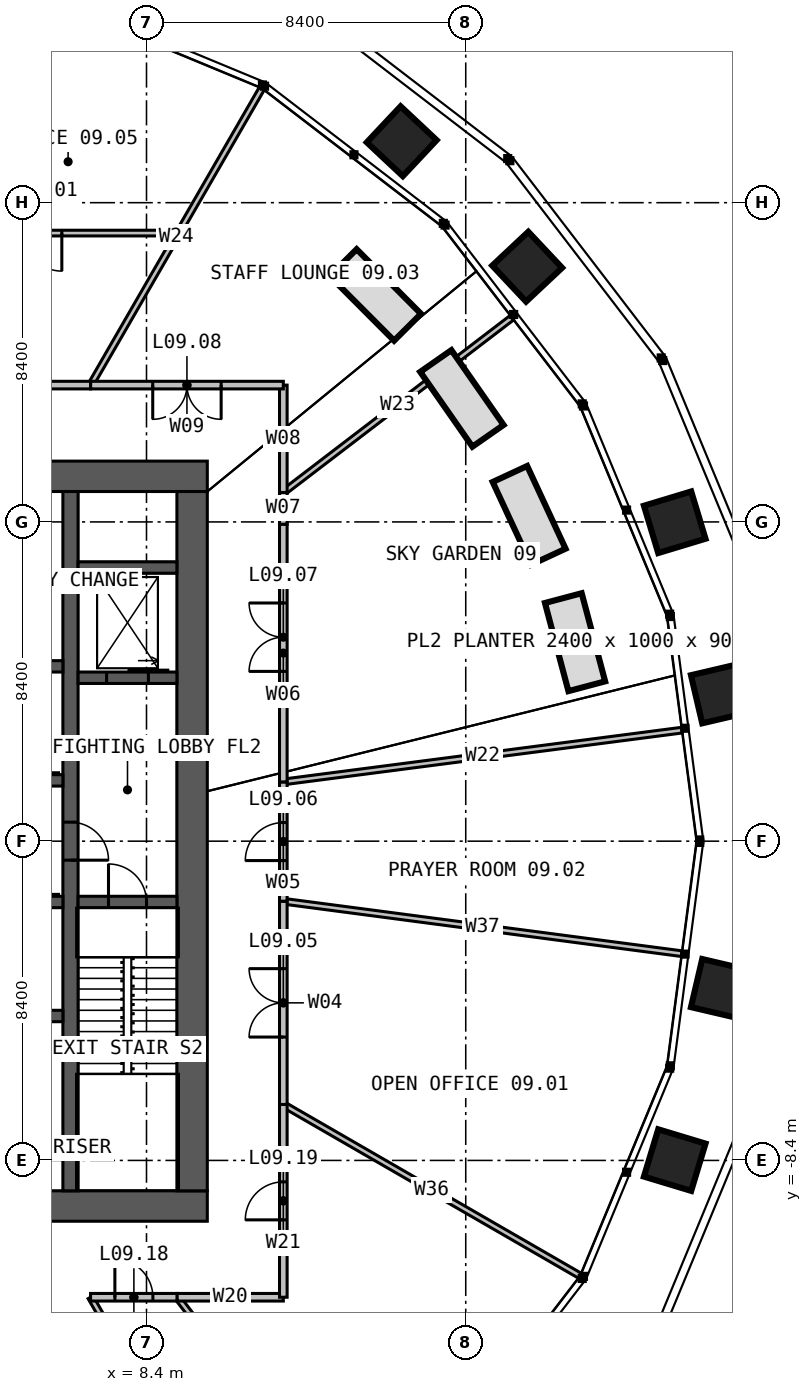
"""IFC4 building model, lengths in metres.
Left out: names, types, materials, properties, quantities, classifications, styles, units other than length and angle.
Written with IfcOpenShell. Run it as: python <this file> out.ifc"""

import sys

from ifc_helpers import new_model, si_unit, direction, frame, frame_2d, origin, place, context, subcontext, project, spatial, rectangle, extrude, element, fill, save


model = new_model("IFC4")
c1 = context("Model", 3, precision=1e-05, world=origin(), true_north=direction((0.0, 1.0)))
c2 = subcontext(c1, "Body", "Model", "MODEL_VIEW")
j1 = project(units=[si_unit("LENGTHUNIT", "METRE"), si_unit("PLANEANGLEUNIT", "RADIAN")], contexts=[c1])
p1 = place(None, origin())
s1 = spatial("IfcSite", under=j1, at=p1, CompositionType="ELEMENT")
p2 = place(p1, origin())
s2 = spatial("IfcBuilding", under=s1, at=p2, CompositionType="ELEMENT")
p3 = place(p2, frame((0.0, 0.0, 41.0)))
s3 = spatial("IfcBuildingStorey", under=s2, at=p3, CompositionType="ELEMENT", Elevation=41.0)
p4 = place(p3, frame((-10.0, 9.6, 0.0), z_axis=(0.0, 0.0, 1.0), x_axis=(1.0, 0.0, 0.0)))
e1 = element("IfcWall", 1, at=p4, inside=s3, PredefinedType="SOLIDWALL", context=c2, shape_type="SweptSolid", body=[
    extrude(rectangle(XDim=20.0, YDim=0.8, at=frame_2d((10.0, 0.0))), origin(), (0.0, 0.0, 1.0), 4.0),
])
p5 = place(p4, frame((9.4, 0.0, 0.0)))
e2 = element("IfcOpeningElement", 2, at=p5, cuts=e1, PredefinedType="OPENING", context=c2, shape_type="SweptSolid", body=[
    extrude(rectangle(XDim=1.2, YDim=2.2, at=frame_2d((0.6, 1.1))), frame((0.0, 0.41, 0.0), z_axis=(0.0, -1.0, 0.0), x_axis=(1.0, 0.0, 0.0)), (0.0, 0.0, 1.0), 0.82),
])
p6 = place(p3, frame((10.0, -9.6, 0.0), z_axis=(0.0, 0.0, 1.0), x_axis=(-1.0, 0.0, 0.0)))
e3 = element("IfcWall", 3, at=p6, inside=s3, PredefinedType="SOLIDWALL", context=c2, shape_type="SweptSolid", body=[
    extrude(rectangle(XDim=20.0, YDim=0.8, at=frame_2d((10.0, 0.0))), origin(), (0.0, 0.0, 1.0), 4.0),
])
p7 = place(p6, frame((6.875, 0.0, 0.0)))
e4 = element("IfcOpeningElement", 4, at=p7, cuts=e3, PredefinedType="OPENING", context=c2, shape_type="SweptSolid", body=[
    extrude(rectangle(XDim=1.2, YDim=2.2, at=frame_2d((0.6, 1.1))), frame((0.0, 0.41, 0.0), z_axis=(0.0, -1.0, 0.0), x_axis=(1.0, 0.0, 0.0)), (0.0, 0.0, 1.0), 0.82),
])
p8 = place(p3, frame((9.6, -9.2, 0.0), z_axis=(0.0, 0.0, 1.0), x_axis=(0.0, 1.0, 0.0)))
e5 = element("IfcWall", 5, at=p8, inside=s3, PredefinedType="SOLIDWALL", context=c2, shape_type="SweptSolid", body=[
    extrude(rectangle(XDim=18.4, YDim=0.8, at=frame_2d((9.2, 0.0))), origin(), (0.0, 0.0, 1.0), 4.0),
])
p9 = place(p3, frame((6.4, 9.2, 0.0), z_axis=(0.0, 0.0, 1.0), x_axis=(0.0, -1.0, 0.0)))
e6 = element("IfcWall", 6, at=p9, inside=s3, PredefinedType="SOLIDWALL", context=c2, shape_type="SweptSolid", body=[
    extrude(rectangle(XDim=18.4, YDim=0.4, at=frame_2d((9.2, 0.0))), origin(), (0.0, 0.0, 1.0), 4.0),
])
p10 = place(p9, frame((8.7, 0.0, 0.0)))
e7 = element("IfcOpeningElement", 7, at=p10, cuts=e6, PredefinedType="OPENING", context=c2, shape_type="SweptSolid", body=[
    extrude(rectangle(XDim=1.0, YDim=2.2, at=frame_2d((0.5, 1.1))), frame((0.0, 0.21, 0.0), z_axis=(0.0, -1.0, 0.0), x_axis=(1.0, 0.0, 0.0)), (0.0, 0.0, 1.0), 0.42),
])
p11 = place(p3, frame((1.35, 1.6, 0.0), z_axis=(0.0, 0.0, 1.0), x_axis=(1.0, 0.0, 0.0)))
e8 = element("IfcWall", 8, at=p11, inside=s3, PredefinedType="SOLIDWALL", context=c2, shape_type="SweptSolid", body=[
    extrude(rectangle(XDim=4.85, YDim=0.3, at=frame_2d((2.425, 0.0))), origin(), (0.0, 0.0, 1.0), 4.0),
])
p12 = place(p11, frame((0.6, 0.0, 0.0)))
e9 = element("IfcOpeningElement", 9, at=p12, cuts=e8, PredefinedType="OPENING", context=c2, shape_type="SweptSolid", body=[
    extrude(rectangle(XDim=1.1, YDim=2.2, at=frame_2d((0.55, 1.1))), frame((0.0, 0.16, 0.0), z_axis=(0.0, -1.0, 0.0), x_axis=(1.0, 0.0, 0.0)), (0.0, 0.0, 1.0), 0.32),
])
p13 = place(p11, frame((3.125, 0.0, 0.0)))
e10 = element("IfcOpeningElement", 10, at=p13, cuts=e8, PredefinedType="OPENING", context=c2, shape_type="SweptSolid", body=[
    extrude(rectangle(XDim=1.1, YDim=2.2, at=frame_2d((0.55, 1.1))), frame((0.0, 0.16, 0.0), z_axis=(0.0, -1.0, 0.0), x_axis=(1.0, 0.0, 0.0)), (0.0, 0.0, 1.0), 0.32),
])
p14 = place(p3, frame((1.35, 4.6, 0.0), z_axis=(0.0, 0.0, 1.0), x_axis=(1.0, 0.0, 0.0)))
e11 = element("IfcWall", 11, at=p14, inside=s3, PredefinedType="SOLIDWALL", context=c2, shape_type="SweptSolid", body=[
    extrude(rectangle(XDim=4.85, YDim=0.3, at=frame_2d((2.425, 0.0))), origin(), (0.0, 0.0, 1.0), 4.0),
])
p15 = place(p3, frame((3.85, -1.6, 0.0), z_axis=(0.0, 0.0, 1.0), x_axis=(1.0, 0.0, 0.0)))
e12 = element("IfcWall", 12, at=p15, inside=s3, PredefinedType="SOLIDWALL", context=c2, shape_type="SweptSolid", body=[
    extrude(rectangle(XDim=2.35, YDim=0.3, at=frame_2d((1.175, 0.0))), origin(), (0.0, 0.0, 1.0), 4.0),
])
p16 = place(p15, frame((0.625, 0.0, 0.0)))
e13 = element("IfcOpeningElement", 13, at=p16, cuts=e12, PredefinedType="OPENING", context=c2, shape_type="SweptSolid", body=[
    extrude(rectangle(XDim=1.1, YDim=2.2, at=frame_2d((0.55, 1.1))), frame((0.0, 0.16, 0.0), z_axis=(0.0, -1.0, 0.0), x_axis=(1.0, 0.0, 0.0)), (0.0, 0.0, 1.0), 0.32),
])
p17 = place(p3, frame((3.85, -4.6, 0.0), z_axis=(0.0, 0.0, 1.0), x_axis=(1.0, 0.0, 0.0)))
e14 = element("IfcWall", 14, at=p17, inside=s3, PredefinedType="SOLIDWALL", context=c2, shape_type="SweptSolid", body=[
    extrude(rectangle(XDim=2.35, YDim=0.3, at=frame_2d((1.175, 0.0))), origin(), (0.0, 0.0, 1.0), 4.0),
])
p18 = place(p3, frame((6.6, -1.6, 0.0), z_axis=(0.0, 0.0, 1.0), x_axis=(1.0, 0.0, 0.0)))
e15 = element("IfcWall", 15, at=p18, inside=s3, PredefinedType="SOLIDWALL", context=c2, shape_type="SweptSolid", body=[
    extrude(rectangle(XDim=2.6, YDim=0.3, at=frame_2d((1.3, 0.0))), origin(), (0.0, 0.0, 1.0), 4.0),
])
p19 = place(p18, frame((0.8, 0.0, 0.0)))
e16 = element("IfcOpeningElement", 16, at=p19, cuts=e15, PredefinedType="OPENING", context=c2, shape_type="SweptSolid", body=[
    extrude(rectangle(XDim=1.0, YDim=2.2, at=frame_2d((0.5, 1.1))), frame((0.0, 0.16, 0.0), z_axis=(0.0, -1.0, 0.0), x_axis=(1.0, 0.0, 0.0)), (0.0, 0.0, 1.0), 0.32),
])
p20 = place(p3, frame((6.6, 4.3, 0.0), z_axis=(0.0, 0.0, 1.0), x_axis=(1.0, 0.0, 0.0)))
e17 = element("IfcWall", 17, at=p20, inside=s3, PredefinedType="SOLIDWALL", context=c2, shape_type="SweptSolid", body=[
    extrude(rectangle(XDim=2.6, YDim=0.3, at=frame_2d((1.3, 0.0))), origin(), (0.0, 0.0, 1.0), 4.0),
])
p21 = place(p20, frame((0.75, 0.0, 0.0)))
e18 = element("IfcOpeningElement", 18, at=p21, cuts=e17, PredefinedType="OPENING", context=c2, shape_type="SweptSolid", body=[
    extrude(rectangle(XDim=1.1, YDim=2.2, at=frame_2d((0.55, 1.1))), frame((0.0, 0.16, 0.0), z_axis=(0.0, -1.0, 0.0), x_axis=(1.0, 0.0, 0.0)), (0.0, 0.0, 1.0), 0.32),
])
p22 = place(p3, frame((6.6, 7.2, 0.0), z_axis=(0.0, 0.0, 1.0), x_axis=(1.0, 0.0, 0.0)))
e19 = element("IfcWall", 19, at=p22, inside=s3, PredefinedType="SOLIDWALL", context=c2, shape_type="SweptSolid", body=[
    extrude(rectangle(XDim=2.6, YDim=0.3, at=frame_2d((1.3, 0.0))), origin(), (0.0, 0.0, 1.0), 4.0),
])
p23 = place(p3, frame((1.35, 6.8, 0.0), z_axis=(0.0, 0.0, 1.0), x_axis=(1.0, 0.0, 0.0)))
e20 = element("IfcWall", 20, at=p23, inside=s3, PredefinedType="PARTITIONING", context=c2, shape_type="SweptSolid", body=[
    extrude(rectangle(XDim=4.85, YDim=0.15, at=frame_2d((2.425, 0.0))), origin(), (0.0, 0.0, 1.0), 3.75),
])
p24 = place(p3, frame((12.0, -6.928, 0.0), z_axis=(0.0, 0.0, 1.0), x_axis=(0.866027720199, -0.49999598783, 0.0)))
e21 = element("IfcWall", 21, at=p24, inside=s3, PredefinedType="PARTITIONING", context=c2, shape_type="SweptSolid", body=[
    extrude(rectangle(XDim=9.014, YDim=0.15, at=frame_2d((4.507, 0.0))), origin(), (0.0, 0.0, 1.0), 2.79),
])
p25 = place(p3, frame((12.0, -1.58, 0.0), z_axis=(0.0, 0.0, 1.0), x_axis=(0.991443601308, -0.130535763012, 0.0)))
e22 = element("IfcWall", 22, at=p25, inside=s3, PredefinedType="PARTITIONING", context=c2, shape_type="SweptSolid", body=[
    extrude(rectangle(XDim=10.571, YDim=0.15, at=frame_2d((5.285, 0.0))), origin(), (0.0, 0.0, 1.0), 2.79),
])
p26 = place(p3, frame((12.0, 1.559, 0.0), z_axis=(0.0, 0.0, 1.0), x_axis=(0.991668511497, 0.128816005626, 0.0)))
e23 = element("IfcWall", 23, at=p26, inside=s3, PredefinedType="PARTITIONING", context=c2, shape_type="SweptSolid", body=[
    extrude(rectangle(XDim=10.574, YDim=0.15, at=frame_2d((5.287, 0.0))), origin(), (0.0, 0.0, 1.0), 2.79),
])
p27 = place(p3, frame((12.0, 9.175, 0.0), z_axis=(0.0, 0.0, 1.0), x_axis=(0.794391707198, 0.607405807952, 0.0)))
e24 = element("IfcWall", 24, at=p27, inside=s3, PredefinedType="PARTITIONING", context=c2, shape_type="SweptSolid", body=[
    extrude(rectangle(XDim=7.569, YDim=0.15, at=frame_2d((3.784, 0.0))), origin(), (0.0, 0.0, 1.0), 2.79),
])
p28 = place(p3, frame((6.928, 12.0, 0.0), z_axis=(0.0, 0.0, 1.0), x_axis=(0.49999598783, 0.866027720199, 0.0)))
e25 = element("IfcWall", 25, at=p28, inside=s3, PredefinedType="PARTITIONING", context=c2, shape_type="SweptSolid", body=[
    extrude(rectangle(XDim=9.014, YDim=0.15, at=frame_2d((4.507, 0.0))), origin(), (0.0, 0.0, 1.0), 2.79),
])
p29 = place(p3, frame((3.215, -12.0, 0.0), z_axis=(0.0, 0.0, 1.0), x_axis=(0.25882174838, -0.965925101944, 0.0)))
e26 = element("IfcWall", 26, at=p29, inside=s3, PredefinedType="PARTITIONING", context=c2, shape_type="SweptSolid", body=[
    extrude(rectangle(XDim=10.447, YDim=0.15, at=frame_2d((5.223, 0.0))), origin(), (0.0, 0.0, 1.0), 2.79),
])
p30 = place(p3, frame((6.928, -12.0, 0.0), z_axis=(0.0, 0.0, 1.0), x_axis=(0.49999598783, -0.866027720199, 0.0)))
e27 = element("IfcWall", 27, at=p30, inside=s3, PredefinedType="PARTITIONING", context=c2, shape_type="SweptSolid", body=[
    extrude(rectangle(XDim=9.014, YDim=0.15, at=frame_2d((4.507, 0.0))), origin(), (0.0, 0.0, 1.0), 2.79),
])
p31 = place(p3, frame((9.208, -12.0, 0.0), z_axis=(0.0, 0.0, 1.0), x_axis=(0.608755356011, -0.793358000229, 0.0)))
e28 = element("IfcWall", 28, at=p31, inside=s3, PredefinedType="PARTITIONING", context=c2, shape_type="SweptSolid", body=[
    extrude(rectangle(XDim=7.549, YDim=0.15, at=frame_2d((3.774, 0.0))), origin(), (0.0, 0.0, 1.0), 2.79),
])
p32 = place(p3, frame((12.0, -6.928, 0.0), z_axis=(0.0, 0.0, 1.0), x_axis=(0.0, 1.0, 0.0)))
e29 = element("IfcWall", 29, at=p32, inside=s3, PredefinedType="PARTITIONING", context=c2, shape_type="SweptSolid", body=[
    extrude(rectangle(XDim=5.348, YDim=0.2, at=frame_2d((2.674, 0.0))), origin(), (0.0, 0.0, 1.0), 3.8),
])
p33 = place(p32, frame((1.774, 0.0, 0.0)))
e30 = element("IfcOpeningElement", 30, at=p33, cuts=e29, PredefinedType="OPENING", context=c2, shape_type="SweptSolid", body=[
    extrude(rectangle(XDim=1.8, YDim=2.2, at=frame_2d((0.9, 1.1))), frame((0.0, 0.11, 0.0), z_axis=(0.0, -1.0, 0.0), x_axis=(1.0, 0.0, 0.0)), (0.0, 0.0, 1.0), 0.22),
])
p34 = place(p3, frame((12.0, -1.58, 0.0), z_axis=(0.0, 0.0, 1.0), x_axis=(0.0, 1.0, 0.0)))
e31 = element("IfcWall", 31, at=p34, inside=s3, PredefinedType="PARTITIONING", context=c2, shape_type="SweptSolid", body=[
    extrude(rectangle(XDim=3.139, YDim=0.2, at=frame_2d((1.569, 0.0))), origin(), (0.0, 0.0, 1.0), 3.8),
])
p35 = place(p34, frame((1.069, 0.0, 0.0)))
e32 = element("IfcOpeningElement", 32, at=p35, cuts=e31, PredefinedType="OPENING", context=c2, shape_type="SweptSolid", body=[
    extrude(rectangle(XDim=1.0, YDim=2.2, at=frame_2d((0.5, 1.1))), frame((0.0, 0.11, 0.0), z_axis=(0.0, -1.0, 0.0), x_axis=(1.0, 0.0, 0.0)), (0.0, 0.0, 1.0), 0.22),
])
p36 = place(p3, frame((12.0, 1.559, 0.0), z_axis=(0.0, 0.0, 1.0), x_axis=(0.0, 1.0, 0.0)))
e33 = element("IfcWall", 33, at=p36, inside=s3, PredefinedType="PARTITIONING", context=c2, shape_type="SweptSolid", body=[
    extrude(rectangle(XDim=6.781, YDim=0.2, at=frame_2d((3.391, 0.0))), origin(), (0.0, 0.0, 1.0), 3.2),
])
p37 = place(p36, frame((2.908, 0.0, 0.0)))
e34 = element("IfcOpeningElement", 34, at=p37, cuts=e33, PredefinedType="OPENING", context=c2, shape_type="SweptSolid", body=[
    extrude(rectangle(XDim=1.8, YDim=2.2, at=frame_2d((0.9, 1.1))), frame((0.0, 0.11, 0.0), z_axis=(0.0, -1.0, 0.0), x_axis=(1.0, 0.0, 0.0)), (0.0, 0.0, 1.0), 0.22),
])
p38 = place(p3, frame((12.0, 8.34, 0.0), z_axis=(0.0, 0.0, 1.0), x_axis=(0.0, 1.0, 0.0)))
e35 = element("IfcWall", 35, at=p38, inside=s3, PredefinedType="PARTITIONING", context=c2, shape_type="SweptSolid", body=[
    extrude(rectangle(XDim=0.835, YDim=0.2, at=frame_2d((0.417, 0.0))), origin(), (0.0, 0.0, 1.0), 3.8),
])
p39 = place(p3, frame((12.0, 9.175, 0.0), z_axis=(0.0, 0.0, 1.0), x_axis=(0.0, 1.0, 0.0)))
e36 = element("IfcWall", 36, at=p39, inside=s3, PredefinedType="PARTITIONING", context=c2, shape_type="SweptSolid", body=[
    extrude(rectangle(XDim=2.825, YDim=0.2, at=frame_2d((1.413, 0.0))), origin(), (0.0, 0.0, 1.0), 3.8),
])
p40 = place(p3, frame((12.0, 12.0, 0.0), z_axis=(0.0, 0.0, 1.0), x_axis=(-1.0, 0.0, 0.0)))
e37 = element("IfcWall", 37, at=p40, inside=s3, PredefinedType="PARTITIONING", context=c2, shape_type="SweptSolid", body=[
    extrude(rectangle(XDim=5.072, YDim=0.2, at=frame_2d((2.536, 0.0))), origin(), (0.0, 0.0, 1.0), 3.8),
])
p41 = place(p40, frame((1.636, 0.0, 0.0)))
e38 = element("IfcOpeningElement", 38, at=p41, cuts=e37, PredefinedType="OPENING", context=c2, shape_type="SweptSolid", body=[
    extrude(rectangle(XDim=1.8, YDim=2.2, at=frame_2d((0.9, 1.1))), frame((0.0, 0.11, 0.0), z_axis=(0.0, -1.0, 0.0), x_axis=(1.0, 0.0, 0.0)), (0.0, 0.0, 1.0), 0.22),
])
p42 = place(p3, frame((9.238, 16.0, 0.0), z_axis=(0.0, 0.0, 1.0), x_axis=(-1.0, 0.0, 0.0)))
e39 = element("IfcWall", 39, at=p42, inside=s3, PredefinedType="PARTITIONING", context=c2, shape_type="SweptSolid", body=[
    extrude(rectangle(XDim=18.475, YDim=0.15, at=frame_2d((9.238, 0.0))), origin(), (0.0, 0.0, 1.0), 2.79),
])
p43 = place(p42, frame((3.066, 0.0, 0.0)))
e40 = element("IfcOpeningElement", 40, at=p43, cuts=e39, PredefinedType="OPENING", context=c2, shape_type="SweptSolid", body=[
    extrude(rectangle(XDim=1.0, YDim=2.2, at=frame_2d((0.5, 1.1))), frame((0.0, 0.085, 0.0), z_axis=(0.0, -1.0, 0.0), x_axis=(1.0, 0.0, 0.0)), (0.0, 0.0, 1.0), 0.17),
])
p44 = place(p42, frame((9.828, 0.0, 0.0)))
e41 = element("IfcOpeningElement", 41, at=p44, cuts=e39, PredefinedType="OPENING", context=c2, shape_type="SweptSolid", body=[
    extrude(rectangle(XDim=1.0, YDim=2.2, at=frame_2d((0.5, 1.1))), frame((0.0, 0.085, 0.0), z_axis=(0.0, -1.0, 0.0), x_axis=(1.0, 0.0, 0.0)), (0.0, 0.0, 1.0), 0.17),
])
p45 = place(p42, frame((14.195, 0.0, 0.0)))
e42 = element("IfcOpeningElement", 42, at=p45, cuts=e39, PredefinedType="OPENING", context=c2, shape_type="SweptSolid", body=[
    extrude(rectangle(XDim=1.0, YDim=2.2, at=frame_2d((0.5, 1.1))), frame((0.0, 0.085, 0.0), z_axis=(0.0, -1.0, 0.0), x_axis=(1.0, 0.0, 0.0)), (0.0, 0.0, 1.0), 0.17),
])
p46 = place(p42, frame((16.67, 0.0, 0.0)))
e43 = element("IfcOpeningElement", 43, at=p46, cuts=e39, PredefinedType="OPENING", context=c2, shape_type="SweptSolid", body=[
    extrude(rectangle(XDim=1.0, YDim=2.2, at=frame_2d((0.5, 1.1))), frame((0.0, 0.085, 0.0), z_axis=(0.0, -1.0, 0.0), x_axis=(1.0, 0.0, 0.0)), (0.0, 0.0, 1.0), 0.17),
])
p47 = place(p3, frame((6.928, 12.0, 0.0), z_axis=(0.0, 0.0, 1.0), x_axis=(-1.0, 0.0, 0.0)))
e44 = element("IfcWall", 44, at=p47, inside=s3, PredefinedType="PARTITIONING", context=c2, shape_type="SweptSolid", body=[
    extrude(rectangle(XDim=13.856, YDim=0.2, at=frame_2d((6.928, 0.0))), origin(), (0.0, 0.0, 1.0), 3.8),
])
p48 = place(p47, frame((6.028, 0.0, 0.0)))
e45 = element("IfcOpeningElement", 45, at=p48, cuts=e44, PredefinedType="OPENING", context=c2, shape_type="SweptSolid", body=[
    extrude(rectangle(XDim=1.8, YDim=2.2, at=frame_2d((0.9, 1.1))), frame((0.0, 0.11, 0.0), z_axis=(0.0, -1.0, 0.0), x_axis=(1.0, 0.0, 0.0)), (0.0, 0.0, 1.0), 0.22),
])
p49 = place(p3, frame((6.928, -12.0, 0.0), z_axis=(0.0, 0.0, 1.0), x_axis=(1.0, 0.0, 0.0)))
e46 = element("IfcWall", 46, at=p49, inside=s3, PredefinedType="PARTITIONING", context=c2, shape_type="SweptSolid", body=[
    extrude(rectangle(XDim=2.28, YDim=0.2, at=frame_2d((1.14, 0.0))), origin(), (0.0, 0.0, 1.0), 3.8),
])
p50 = place(p49, frame((0.64, 0.0, 0.0)))
e47 = element("IfcOpeningElement", 47, at=p50, cuts=e46, PredefinedType="OPENING", context=c2, shape_type="SweptSolid", body=[
    extrude(rectangle(XDim=1.0, YDim=2.2, at=frame_2d((0.5, 1.1))), frame((0.0, 0.11, 0.0), z_axis=(0.0, -1.0, 0.0), x_axis=(1.0, 0.0, 0.0)), (0.0, 0.0, 1.0), 0.22),
])
p51 = place(p3, frame((9.208, -12.0, 0.0), z_axis=(0.0, 0.0, 1.0), x_axis=(1.0, 0.0, 0.0)))
e48 = element("IfcWall", 48, at=p51, inside=s3, PredefinedType="PARTITIONING", context=c2, shape_type="SweptSolid", body=[
    extrude(rectangle(XDim=2.792, YDim=0.2, at=frame_2d((1.396, 0.0))), origin(), (0.0, 0.0, 1.0), 3.8),
])
p52 = place(p3, frame((12.0, -12.0, 0.0), z_axis=(0.0, 0.0, 1.0), x_axis=(0.0, 1.0, 0.0)))
e49 = element("IfcWall", 49, at=p52, inside=s3, PredefinedType="PARTITIONING", context=c2, shape_type="SweptSolid", body=[
    extrude(rectangle(XDim=5.072, YDim=0.2, at=frame_2d((2.536, 0.0))), origin(), (0.0, 0.0, 1.0), 3.8),
])
p53 = place(p52, frame((2.036, 0.0, 0.0)))
e50 = element("IfcOpeningElement", 50, at=p53, cuts=e49, PredefinedType="OPENING", context=c2, shape_type="SweptSolid", body=[
    extrude(rectangle(XDim=1.0, YDim=2.2, at=frame_2d((0.5, 1.1))), frame((0.0, 0.11, 0.0), z_axis=(0.0, -1.0, 0.0), x_axis=(1.0, 0.0, 0.0)), (0.0, 0.0, 1.0), 0.22),
])
p54 = place(p10, origin())
e51 = element("IfcDoor", 51, at=p54, inside=s3, OperationType="SINGLE_SWING_RIGHT", PredefinedType="DOOR", context=c2, shape_type="SweptSolid", body=[
    extrude(rectangle(XDim=1.0, YDim=2.2, at=frame_2d((0.5, 1.1))), frame((0.0, 0.025, 0.0), z_axis=(0.0, -1.0, 0.0), x_axis=(1.0, 0.0, 0.0)), (0.0, 0.0, 1.0), 0.05),
])
fill(e7, e51)
p55 = place(p19, origin())
e52 = element("IfcDoor", 52, at=p55, inside=s3, OperationType="SINGLE_SWING_LEFT", PredefinedType="DOOR", context=c2, shape_type="SweptSolid", body=[
    extrude(rectangle(XDim=1.0, YDim=2.2, at=frame_2d((0.5, 1.1))), frame((0.0, 0.025, 0.0), z_axis=(0.0, -1.0, 0.0), x_axis=(1.0, 0.0, 0.0)), (0.0, 0.0, 1.0), 0.05),
])
fill(e16, e52)
p56 = place(p21, origin())
e53 = element("IfcDoor", 53, at=p56, inside=s3, OperationType="SLIDING_TO_LEFT", PredefinedType="DOOR", context=c2, shape_type="SweptSolid", body=[
    extrude(rectangle(XDim=1.1, YDim=2.2, at=frame_2d((0.55, 1.1))), frame((0.0, 0.025, 0.0), z_axis=(0.0, -1.0, 0.0), x_axis=(1.0, 0.0, 0.0)), (0.0, 0.0, 1.0), 0.05),
])
fill(e18, e53)
p57 = place(p33, origin())
e54 = element("IfcDoor", 54, at=p57, inside=s3, OperationType="DOUBLE_DOOR_SINGLE_SWING", PredefinedType="DOOR", context=c2, shape_type="SweptSolid", body=[
    extrude(rectangle(XDim=1.8, YDim=2.2, at=frame_2d((0.9, 1.1))), frame((0.0, 0.025, 0.0), z_axis=(0.0, -1.0, 0.0), x_axis=(1.0, 0.0, 0.0)), (0.0, 0.0, 1.0), 0.05),
])
fill(e30, e54)
p58 = place(p35, origin())
e55 = element("IfcDoor", 55, at=p58, inside=s3, OperationType="SINGLE_SWING_LEFT", PredefinedType="DOOR", context=c2, shape_type="SweptSolid", body=[
    extrude(rectangle(XDim=1.0, YDim=2.2, at=frame_2d((0.5, 1.1))), frame((0.0, 0.025, 0.0), z_axis=(0.0, -1.0, 0.0), x_axis=(1.0, 0.0, 0.0)), (0.0, 0.0, 1.0), 0.05),
])
fill(e32, e55)
p59 = place(p37, origin())
e56 = element("IfcDoor", 56, at=p59, inside=s3, OperationType="DOUBLE_DOOR_SINGLE_SWING", PredefinedType="DOOR", context=c2, shape_type="SweptSolid", body=[
    extrude(rectangle(XDim=1.8, YDim=2.2, at=frame_2d((0.9, 1.1))), frame((0.0, 0.025, 0.0), z_axis=(0.0, -1.0, 0.0), x_axis=(1.0, 0.0, 0.0)), (0.0, 0.0, 1.0), 0.05),
])
fill(e34, e56)
p60 = place(p41, origin())
e57 = element("IfcDoor", 57, at=p60, inside=s3, OperationType="DOUBLE_DOOR_SINGLE_SWING", PredefinedType="DOOR", context=c2, shape_type="SweptSolid", body=[
    extrude(rectangle(XDim=1.8, YDim=2.2, at=frame_2d((0.9, 1.1))), frame((0.0, 0.025, 0.0), z_axis=(0.0, -1.0, 0.0), x_axis=(1.0, 0.0, 0.0)), (0.0, 0.0, 1.0), 0.05),
])
fill(e38, e57)
p61 = place(p43, origin())
e58 = element("IfcDoor", 58, at=p61, inside=s3, OperationType="SINGLE_SWING_LEFT", PredefinedType="DOOR", context=c2, shape_type="SweptSolid", body=[
    extrude(rectangle(XDim=1.0, YDim=2.2, at=frame_2d((0.5, 1.1))), frame((0.0, 0.025, 0.0), z_axis=(0.0, -1.0, 0.0), x_axis=(1.0, 0.0, 0.0)), (0.0, 0.0, 1.0), 0.05),
])
fill(e40, e58)
p62 = place(p50, origin())
e59 = element("IfcDoor", 59, at=p62, inside=s3, OperationType="SINGLE_SWING_LEFT", PredefinedType="DOOR", context=c2, shape_type="SweptSolid", body=[
    extrude(rectangle(XDim=1.0, YDim=2.2, at=frame_2d((0.5, 1.1))), frame((0.0, 0.025, 0.0), z_axis=(0.0, -1.0, 0.0), x_axis=(1.0, 0.0, 0.0)), (0.0, 0.0, 1.0), 0.05),
])
fill(e47, e59)
p63 = place(p53, origin())
e60 = element("IfcDoor", 60, at=p63, inside=s3, OperationType="SINGLE_SWING_LEFT", PredefinedType="DOOR", context=c2, shape_type="SweptSolid", body=[
    extrude(rectangle(XDim=1.0, YDim=2.2, at=frame_2d((0.5, 1.1))), frame((0.0, 0.025, 0.0), z_axis=(0.0, -1.0, 0.0), x_axis=(1.0, 0.0, 0.0)), (0.0, 0.0, 1.0), 0.05),
])
fill(e50, e60)
save(model, sys.argv[1])
